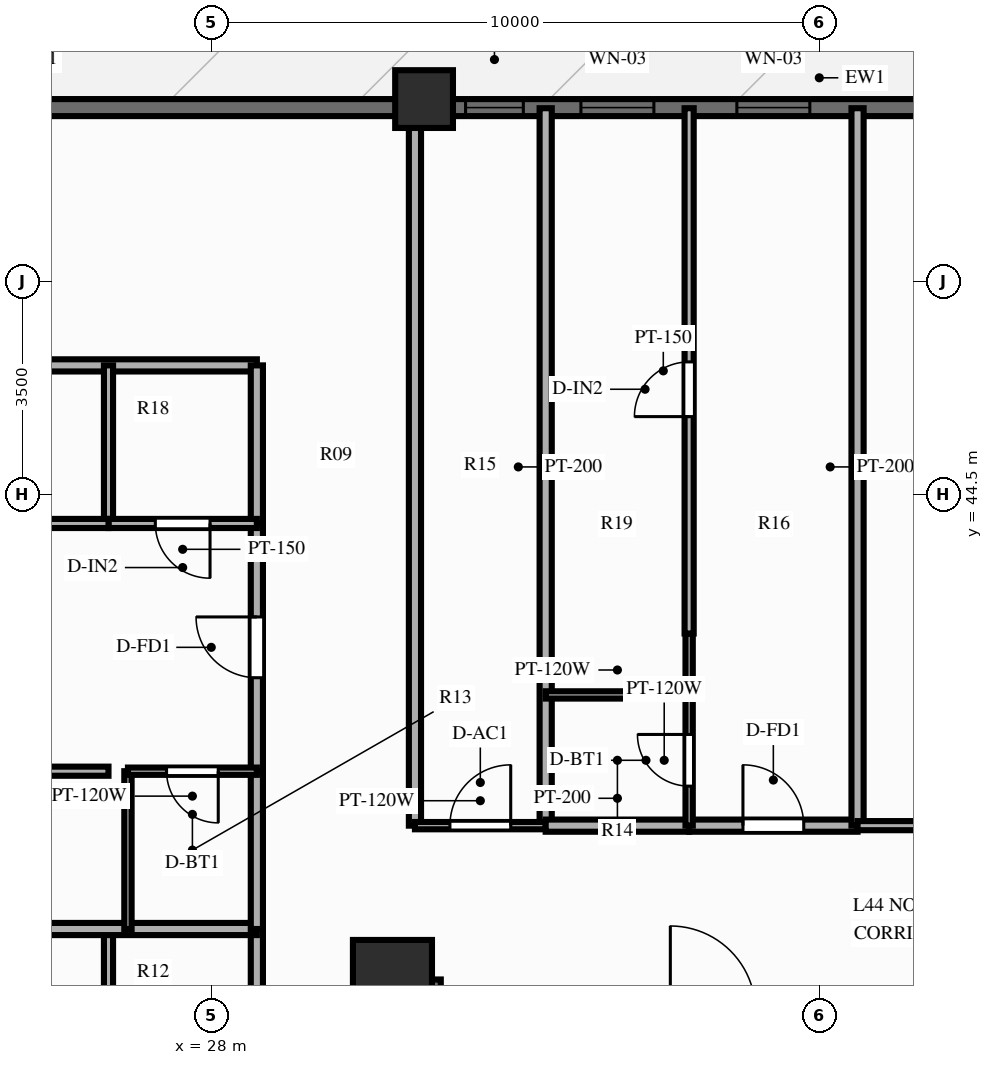
"""IFC4 building model, lengths in metres.
Left out: names, types, materials, properties, quantities, classifications, styles, units other than length and angle.
Written with IfcOpenShell. Run it as: python <this file> out.ifc"""

import sys

from ifc_helpers import new_model, si_unit, direction, frame, frame_2d, origin, origin_2d, place, context, subcontext, project, spatial, rectangle, extrude, source, transform, mapped, element, fill, save


model = new_model("IFC4")
c1 = context("Model", 3, precision=1e-05, world=origin(), true_north=direction((0.0, 1.0)))
c2 = subcontext(c1, "Body", "Model", "MODEL_VIEW")
j1 = project(units=[si_unit("LENGTHUNIT", "METRE"), si_unit("PLANEANGLEUNIT", "RADIAN")], contexts=[c1])
p1 = place(None, origin())
s1 = spatial("IfcSite", under=j1, at=p1, CompositionType="ELEMENT")
p2 = place(p1, origin())
s2 = spatial("IfcBuilding", under=s1, at=p2, CompositionType="ELEMENT")
p3 = place(p2, frame((0.0, 0.0, 138.75)))
s3 = spatial("IfcBuildingStorey", under=s2, at=p3, CompositionType="ELEMENT", Elevation=138.75)
p4 = place(p3, frame((31.5, 17.48, 0.0), z_axis=(0.0, 0.0, 1.0), x_axis=(0.0, 1.0, 0.0)))
e1 = element("IfcWall", 1, at=p4, inside=s3, PredefinedType="SHEAR", context=c2, shape_type="SweptSolid", body=[
    extrude(rectangle(XDim=19.04, YDim=0.55, at=frame_2d((9.52, 0.0))), origin(), (0.0, 0.0, 1.0), 3.0),
])
p5 = place(p4, frame((6.32, 0.0, 0.0)))
e2 = element("IfcOpeningElement", 2, at=p5, cuts=e1, PredefinedType="OPENING", context=c2, shape_type="SweptSolid", body=[
    extrude(rectangle(XDim=1.1, YDim=2.15, at=frame_2d((0.55, 1.075))), frame((0.0, 0.287, 0.0), z_axis=(0.0, -1.0, 0.0), x_axis=(1.0, 0.0, 0.0)), (0.0, 0.0, 1.0), 0.574),
])
m1 = source(origin(), c2, "Body", "SweptSolid", [
    extrude(rectangle(XDim=1.3, YDim=1.3, at=origin_2d()), origin(), (0.0, 0.0, 1.0), 3.0),
])
p6 = place(p3, frame((30.98, 36.52, 0.0), z_axis=(0.0, 0.0, 1.0), x_axis=(1.0, 0.0, 0.0)))
e3 = element("IfcColumn", 3, at=p6, inside=s3, PredefinedType="COLUMN", context=c2, shape_type="MappedRepresentation", body=[
    mapped(m1, transform((0.0, 0.0, 0.0), scale=1.0)),
])
m2 = source(origin(), c2, "Body", "SweptSolid", [
    extrude(rectangle(XDim=0.95, YDim=0.95, at=origin_2d()), origin(), (0.0, 0.0, 1.0), 3.0),
])
p7 = place(p3, frame((31.5, 51.0, 0.0), z_axis=(0.0, 0.0, 1.0), x_axis=(1.0, 0.0, 0.0)))
e4 = element("IfcColumn", 4, at=p7, inside=s3, PredefinedType="COLUMN", context=c2, shape_type="MappedRepresentation", body=[
    mapped(m2, transform((0.0, 0.0, 0.0), scale=1.0)),
])
p8 = place(p3, frame((16.2, 50.86, 0.0), z_axis=(0.0, 0.0, 1.0), x_axis=(1.0, 0.0, 0.0)))
e5 = element("IfcWall", 5, at=p8, inside=s3, PredefinedType="SOLIDWALL", context=c2, shape_type="SweptSolid", body=[
    extrude(rectangle(XDim=43.6, YDim=0.28, at=frame_2d((21.8, 0.0))), origin(), (0.0, 0.0, 1.0), 2.28),
])
p9 = place(p8, frame((7.1, 0.0, 0.0)))
e6 = element("IfcOpeningElement", 6, at=p9, cuts=e5, PredefinedType="OPENING", context=c2, shape_type="SweptSolid", body=[
    extrude(rectangle(XDim=1.1, YDim=2.15, at=frame_2d((0.55, 1.075))), frame((0.0, 0.152, 0.0), z_axis=(0.0, -1.0, 0.0), x_axis=(1.0, 0.0, 0.0)), (0.0, 0.0, 1.0), 0.304),
])
p10 = place(p8, frame((15.982, 0.0, 0.25)))
e7 = element("IfcOpeningElement", 7, at=p10, cuts=e5, PredefinedType="OPENING", context=c2, shape_type="SweptSolid", body=[
    extrude(rectangle(XDim=0.95, YDim=1.5, at=frame_2d((0.475, 0.75))), frame((0.0, 0.152, 0.0), z_axis=(0.0, -1.0, 0.0), x_axis=(1.0, 0.0, 0.0)), (0.0, 0.0, 1.0), 0.304),
])
p11 = place(p8, frame((17.88, 0.0, 0.25)))
e8 = element("IfcOpeningElement", 8, at=p11, cuts=e5, PredefinedType="OPENING", context=c2, shape_type="SweptSolid", body=[
    extrude(rectangle(XDim=1.2, YDim=1.5, at=frame_2d((0.6, 0.75))), frame((0.0, 0.152, 0.0), z_axis=(0.0, -1.0, 0.0), x_axis=(1.0, 0.0, 0.0)), (0.0, 0.0, 1.0), 0.304),
])
p12 = place(p8, frame((20.444, 0.0, 0.25)))
e9 = element("IfcOpeningElement", 9, at=p12, cuts=e5, PredefinedType="OPENING", context=c2, shape_type="SweptSolid", body=[
    extrude(rectangle(XDim=1.2, YDim=1.5, at=frame_2d((0.6, 0.75))), frame((0.0, 0.152, 0.0), z_axis=(0.0, -1.0, 0.0), x_axis=(1.0, 0.0, 0.0)), (0.0, 0.0, 1.0), 0.304),
])
p13 = place(p8, frame((24.607, 0.0, 0.25)))
e10 = element("IfcOpeningElement", 10, at=p13, cuts=e5, PredefinedType="OPENING", context=c2, shape_type="SweptSolid", body=[
    extrude(rectangle(XDim=1.2, YDim=1.5, at=frame_2d((0.6, 0.75))), frame((0.0, 0.152, 0.0), z_axis=(0.0, -1.0, 0.0), x_axis=(1.0, 0.0, 0.0)), (0.0, 0.0, 1.0), 0.304),
])
p14 = place(p8, frame((35.35, 0.0, 0.25)))
e11 = element("IfcOpeningElement", 11, at=p14, cuts=e5, PredefinedType="OPENING", context=c2, shape_type="SweptSolid", body=[
    extrude(rectangle(XDim=1.2, YDim=1.5, at=frame_2d((0.6, 0.75))), frame((0.0, 0.152, 0.0), z_axis=(0.0, -1.0, 0.0), x_axis=(1.0, 0.0, 0.0)), (0.0, 0.0, 1.0), 0.304),
])
p15 = place(p3, frame((31.35, 39.05, 0.0), z_axis=(0.0, 0.0, 1.0), x_axis=(0.0, 1.0, 0.0)))
e12 = element("IfcWall", 12, at=p15, inside=s3, PredefinedType="PARTITIONING", context=c2, shape_type="SweptSolid", body=[
    extrude(rectangle(XDim=11.8, YDim=0.2, at=frame_2d((5.9, 0.0))), origin(), (0.0, 0.0, 1.0), 2.34),
])
p16 = place(p3, frame((33.5, 39.05, 0.0), z_axis=(0.0, 0.0, 1.0), x_axis=(0.0, 1.0, 0.0)))
e13 = element("IfcWall", 13, at=p16, inside=s3, PredefinedType="PARTITIONING", context=c2, shape_type="SweptSolid", body=[
    extrude(rectangle(XDim=11.8, YDim=0.2, at=frame_2d((5.9, 0.0))), origin(), (0.0, 0.0, 1.0), 2.79),
])
p17 = place(p3, frame((31.35, 39.05, 0.0), z_axis=(0.0, 0.0, 1.0), x_axis=(1.0, 0.0, 0.0)))
e14 = element("IfcWall", 14, at=p17, inside=s3, PredefinedType="PARTITIONING", context=c2, shape_type="SweptSolid", body=[
    extrude(rectangle(XDim=2.15, YDim=0.12, at=frame_2d((1.075, 0.0))), origin(), (0.0, 0.0, 1.0), 2.79),
])
p18 = place(p17, frame((0.575, 0.0, 0.0)))
e15 = element("IfcOpeningElement", 15, at=p18, cuts=e14, PredefinedType="OPENING", context=c2, shape_type="SweptSolid", body=[
    extrude(rectangle(XDim=1.0, YDim=2.1, at=frame_2d((0.5, 1.05))), frame((0.0, 0.072, 0.0), z_axis=(0.0, -1.0, 0.0), x_axis=(1.0, 0.0, 0.0)), (0.0, 0.0, 1.0), 0.144),
])
p19 = place(p3, frame((33.5, 39.05, 0.0), z_axis=(0.0, 0.0, 1.0), x_axis=(1.0, 0.0, 0.0)))
e16 = element("IfcWall", 16, at=p19, inside=s3, PredefinedType="PARTITIONING", context=c2, shape_type="SweptSolid", body=[
    extrude(rectangle(XDim=2.359, YDim=0.2, at=frame_2d((1.18, 0.0))), origin(), (0.0, 0.0, 1.0), 2.79),
])
p20 = place(p3, frame((35.859, 39.05, 0.0), z_axis=(0.0, 0.0, 1.0), x_axis=(1.0, 0.0, 0.0)))
e17 = element("IfcWall", 17, at=p20, inside=s3, PredefinedType="PARTITIONING", context=c2, shape_type="SweptSolid", body=[
    extrude(rectangle(XDim=2.77, YDim=0.2, at=frame_2d((1.385, 0.0))), origin(), (0.0, 0.0, 1.0), 2.79),
])
p21 = place(p20, frame((0.885, 0.0, 0.0)))
e18 = element("IfcOpeningElement", 18, at=p21, cuts=e17, PredefinedType="OPENING", context=c2, shape_type="SweptSolid", body=[
    extrude(rectangle(XDim=1.0, YDim=2.15, at=frame_2d((0.5, 1.075))), frame((0.0, 0.112, 0.0), z_axis=(0.0, -1.0, 0.0), x_axis=(1.0, 0.0, 0.0)), (0.0, 0.0, 1.0), 0.224),
])
p22 = place(p3, frame((35.859, 39.05, 0.0), z_axis=(0.0, 0.0, 1.0), x_axis=(0.0, 1.0, 0.0)))
e19 = element("IfcWall", 19, at=p22, inside=s3, PredefinedType="PARTITIONING", context=c2, shape_type="SweptSolid", body=[
    extrude(rectangle(XDim=2.15, YDim=0.12, at=frame_2d((1.075, 0.0))), origin(), (0.0, 0.0, 1.0), 2.79),
])
p23 = place(p22, frame((0.65, 0.0, 0.0)))
e20 = element("IfcOpeningElement", 20, at=p23, cuts=e19, PredefinedType="OPENING", context=c2, shape_type="SweptSolid", body=[
    extrude(rectangle(XDim=0.85, YDim=2.05, at=frame_2d((0.425, 1.025))), frame((0.0, 0.072, 0.0), z_axis=(0.0, -1.0, 0.0), x_axis=(1.0, 0.0, 0.0)), (0.0, 0.0, 1.0), 0.144),
])
p24 = place(p3, frame((35.859, 41.2, 0.0), z_axis=(0.0, 0.0, 1.0), x_axis=(0.0, 1.0, 0.0)))
e21 = element("IfcWall", 21, at=p24, inside=s3, PredefinedType="PARTITIONING", context=c2, shape_type="SweptSolid", body=[
    extrude(rectangle(XDim=1.01, YDim=0.12, at=frame_2d((0.505, 0.0))), origin(), (0.0, 0.0, 1.0), 2.79),
])
p25 = place(p3, frame((33.5, 41.2, 0.0), z_axis=(0.0, 0.0, 1.0), x_axis=(1.0, 0.0, 0.0)))
e22 = element("IfcWall", 22, at=p25, inside=s3, PredefinedType="PARTITIONING", context=c2, shape_type="SweptSolid", body=[
    extrude(rectangle(XDim=2.359, YDim=0.12, at=frame_2d((1.18, 0.0))), origin(), (0.0, 0.0, 1.0), 2.79),
])
p26 = place(p3, frame((35.859, 42.21, 0.0), z_axis=(0.0, 0.0, 1.0), x_axis=(0.0, 1.0, 0.0)))
e23 = element("IfcWall", 23, at=p26, inside=s3, PredefinedType="PARTITIONING", context=c2, shape_type="SweptSolid", body=[
    extrude(rectangle(XDim=8.64, YDim=0.15, at=frame_2d((4.32, 0.0))), origin(), (0.0, 0.0, 1.0), 2.79),
])
p27 = place(p26, frame((3.567, 0.0, 0.0)))
e24 = element("IfcOpeningElement", 24, at=p27, cuts=e23, PredefinedType="OPENING", context=c2, shape_type="SweptSolid", body=[
    extrude(rectangle(XDim=0.9, YDim=2.1, at=frame_2d((0.45, 1.05))), frame((0.0, 0.087, 0.0), z_axis=(0.0, -1.0, 0.0), x_axis=(1.0, 0.0, 0.0)), (0.0, 0.0, 1.0), 0.174),
])
p28 = place(p3, frame((38.629, 39.05, 0.0), z_axis=(0.0, 0.0, 1.0), x_axis=(0.0, 1.0, 0.0)))
e25 = element("IfcWall", 25, at=p28, inside=s3, PredefinedType="PARTITIONING", context=c2, shape_type="SweptSolid", body=[
    extrude(rectangle(XDim=11.8, YDim=0.2, at=frame_2d((5.9, 0.0))), origin(), (0.0, 0.0, 1.0), 2.79),
])
p29 = place(p3, frame((38.629, 39.05, 0.0), z_axis=(0.0, 0.0, 1.0), x_axis=(1.0, 0.0, 0.0)))
e26 = element("IfcWall", 26, at=p29, inside=s3, PredefinedType="PARTITIONING", context=c2, shape_type="SweptSolid", body=[
    extrude(rectangle(XDim=6.021, YDim=0.15, at=frame_2d((3.01, 0.0))), origin(), (0.0, 0.0, 1.0), 2.79),
])
p30 = place(p29, frame((2.46, 0.0, 0.0)))
e27 = element("IfcOpeningElement", 27, at=p30, cuts=e26, PredefinedType="OPENING", context=c2, shape_type="SweptSolid", body=[
    extrude(rectangle(XDim=1.1, YDim=2.15, at=frame_2d((0.55, 1.075))), frame((0.0, 0.087, 0.0), z_axis=(0.0, -1.0, 0.0), x_axis=(1.0, 0.0, 0.0)), (0.0, 0.0, 1.0), 0.174),
])
p31 = place(p3, frame((28.75, 46.62, 0.0), z_axis=(0.0, 0.0, 1.0), x_axis=(-1.0, 0.0, 0.0)))
e28 = element("IfcWall", 28, at=p31, inside=s3, PredefinedType="PARTITIONING", context=c2, shape_type="SweptSolid", body=[
    extrude(rectangle(XDim=16.6, YDim=0.2, at=frame_2d((8.3, 0.0))), origin(), (0.0, 0.0, 1.0), 2.79),
])
p32 = place(p3, frame((28.75, 34.75, 0.0), z_axis=(0.0, 0.0, 1.0), x_axis=(0.0, 1.0, 0.0)))
e29 = element("IfcWall", 29, at=p32, inside=s3, PredefinedType="PARTITIONING", context=c2, shape_type="SweptSolid", body=[
    extrude(rectangle(XDim=2.6, YDim=0.2, at=frame_2d((1.3, 0.0))), origin(), (0.0, 0.0, 1.0), 2.79),
])
p33 = place(p3, frame((26.31, 34.75, 0.0), z_axis=(0.0, 0.0, 1.0), x_axis=(0.0, 1.0, 0.0)))
e30 = element("IfcWall", 30, at=p33, inside=s3, PredefinedType="PARTITIONING", context=c2, shape_type="SweptSolid", body=[
    extrude(rectangle(XDim=2.6, YDim=0.15, at=frame_2d((1.3, 0.0))), origin(), (0.0, 0.0, 1.0), 2.79),
])
p34 = place(p3, frame((28.75, 37.35, 0.0), z_axis=(0.0, 0.0, 1.0), x_axis=(-1.0, 0.0, 0.0)))
e31 = element("IfcWall", 31, at=p34, inside=s3, PredefinedType="PARTITIONING", context=c2, shape_type="SweptSolid", body=[
    extrude(rectangle(XDim=16.6, YDim=0.2, at=frame_2d((8.3, 0.0))), origin(), (0.0, 0.0, 1.0), 2.79),
])
p35 = place(p3, frame((28.75, 37.35, 0.0), z_axis=(0.0, 0.0, 1.0), x_axis=(0.0, 1.0, 0.0)))
e32 = element("IfcWall", 32, at=p35, inside=s3, PredefinedType="PARTITIONING", context=c2, shape_type="SweptSolid", body=[
    extrude(rectangle(XDim=2.595, YDim=0.2, at=frame_2d((1.298, 0.0))), origin(), (0.0, 0.0, 1.0), 2.79),
])
p36 = place(p3, frame((28.75, 39.946, 0.0), z_axis=(0.0, 0.0, 1.0), x_axis=(0.0, 1.0, 0.0)))
e33 = element("IfcWall", 33, at=p36, inside=s3, PredefinedType="PARTITIONING", context=c2, shape_type="SweptSolid", body=[
    extrude(rectangle(XDim=4.074, YDim=0.2, at=frame_2d((2.037, 0.0))), origin(), (0.0, 0.0, 1.0), 2.79),
])
p37 = place(p36, frame((1.537, 0.0, 0.0)))
e34 = element("IfcOpeningElement", 34, at=p37, cuts=e33, PredefinedType="OPENING", context=c2, shape_type="SweptSolid", body=[
    extrude(rectangle(XDim=1.0, YDim=2.15, at=frame_2d((0.5, 1.075))), frame((0.0, 0.112, 0.0), z_axis=(0.0, -1.0, 0.0), x_axis=(1.0, 0.0, 0.0)), (0.0, 0.0, 1.0), 0.224),
])
p38 = place(p3, frame((28.75, 44.02, 0.0), z_axis=(0.0, 0.0, 1.0), x_axis=(0.0, 1.0, 0.0)))
e35 = element("IfcWall", 35, at=p38, inside=s3, PredefinedType="PARTITIONING", context=c2, shape_type="SweptSolid", body=[
    extrude(rectangle(XDim=2.6, YDim=0.2, at=frame_2d((1.3, 0.0))), origin(), (0.0, 0.0, 1.0), 2.79),
])
p39 = place(p3, frame((26.63, 37.35, 0.0), z_axis=(0.0, 0.0, 1.0), x_axis=(0.0, 1.0, 0.0)))
e36 = element("IfcWall", 36, at=p39, inside=s3, PredefinedType="PARTITIONING", context=c2, shape_type="SweptSolid", body=[
    extrude(rectangle(XDim=2.595, YDim=0.12, at=frame_2d((1.298, 0.0))), origin(), (0.0, 0.0, 1.0), 2.79),
])
p40 = place(p3, frame((26.31, 44.02, 0.0), z_axis=(0.0, 0.0, 1.0), x_axis=(0.0, 1.0, 0.0)))
e37 = element("IfcWall", 37, at=p40, inside=s3, PredefinedType="PARTITIONING", context=c2, shape_type="SweptSolid", body=[
    extrude(rectangle(XDim=2.6, YDim=0.15, at=frame_2d((1.3, 0.0))), origin(), (0.0, 0.0, 1.0), 2.79),
])
p41 = place(p3, frame((28.75, 39.946, 0.0), z_axis=(0.0, 0.0, 1.0), x_axis=(-1.0, 0.0, 0.0)))
e38 = element("IfcWall", 38, at=p41, inside=s3, PredefinedType="PARTITIONING", context=c2, shape_type="SweptSolid", body=[
    extrude(rectangle(XDim=2.12, YDim=0.12, at=frame_2d((1.06, 0.0))), origin(), (0.0, 0.0, 1.0), 2.79),
])
p42 = place(p41, frame((0.635, 0.0, 0.0)))
e39 = element("IfcOpeningElement", 39, at=p42, cuts=e38, PredefinedType="OPENING", context=c2, shape_type="SweptSolid", body=[
    extrude(rectangle(XDim=0.85, YDim=2.05, at=frame_2d((0.425, 1.025))), frame((0.0, 0.072, 0.0), z_axis=(0.0, -1.0, 0.0), x_axis=(1.0, 0.0, 0.0)), (0.0, 0.0, 1.0), 0.144),
])
p43 = place(p3, frame((26.31, 39.946, 0.0), z_axis=(0.0, 0.0, 1.0), x_axis=(-1.0, 0.0, 0.0)))
e40 = element("IfcWall", 40, at=p43, inside=s3, PredefinedType="PARTITIONING", context=c2, shape_type="SweptSolid", body=[
    extrude(rectangle(XDim=14.16, YDim=0.15, at=frame_2d((7.08, 0.0))), origin(), (0.0, 0.0, 1.0), 2.79),
])
p44 = place(p43, frame((6.097, 0.0, 0.0)))
e41 = element("IfcOpeningElement", 41, at=p44, cuts=e40, PredefinedType="OPENING", context=c2, shape_type="SweptSolid", body=[
    extrude(rectangle(XDim=0.9, YDim=2.1, at=frame_2d((0.45, 1.05))), frame((0.0, 0.087, 0.0), z_axis=(0.0, -1.0, 0.0), x_axis=(1.0, 0.0, 0.0)), (0.0, 0.0, 1.0), 0.174),
])
p45 = place(p3, frame((28.75, 44.02, 0.0), z_axis=(0.0, 0.0, 1.0), x_axis=(-1.0, 0.0, 0.0)))
e42 = element("IfcWall", 42, at=p45, inside=s3, PredefinedType="PARTITIONING", context=c2, shape_type="SweptSolid", body=[
    extrude(rectangle(XDim=2.44, YDim=0.15, at=frame_2d((1.22, 0.0))), origin(), (0.0, 0.0, 1.0), 2.79),
])
p46 = place(p45, frame((0.77, 0.0, 0.0)))
e43 = element("IfcOpeningElement", 43, at=p46, cuts=e42, PredefinedType="OPENING", context=c2, shape_type="SweptSolid", body=[
    extrude(rectangle(XDim=0.9, YDim=2.1, at=frame_2d((0.45, 1.05))), frame((0.0, 0.087, 0.0), z_axis=(0.0, -1.0, 0.0), x_axis=(1.0, 0.0, 0.0)), (0.0, 0.0, 1.0), 0.174),
])
p47 = place(p3, frame((26.31, 44.02, 0.0), z_axis=(0.0, 0.0, 1.0), x_axis=(-1.0, 0.0, 0.0)))
e44 = element("IfcWall", 44, at=p47, inside=s3, PredefinedType="PARTITIONING", context=c2, shape_type="SweptSolid", body=[
    extrude(rectangle(XDim=14.16, YDim=0.15, at=frame_2d((7.08, 0.0))), origin(), (0.0, 0.0, 1.0), 2.79),
])
p48 = place(p47, frame((6.097, 0.0, 0.0)))
e45 = element("IfcOpeningElement", 45, at=p48, cuts=e44, PredefinedType="OPENING", context=c2, shape_type="SweptSolid", body=[
    extrude(rectangle(XDim=0.9, YDim=2.1, at=frame_2d((0.45, 1.05))), frame((0.0, 0.087, 0.0), z_axis=(0.0, -1.0, 0.0), x_axis=(1.0, 0.0, 0.0)), (0.0, 0.0, 1.0), 0.174),
])
m3 = source(origin(), c2, "Body", "SweptSolid", [
    extrude(rectangle(XDim=0.95, YDim=1.5, at=frame_2d((0.475, 0.75))), frame((0.0, 0.03, 0.0), z_axis=(0.0, -1.0, 0.0), x_axis=(1.0, 0.0, 0.0)), (0.0, 0.0, 1.0), 0.06),
])
p49 = place(p10, origin())
e46 = element("IfcWindow", 46, at=p49, inside=s3, PartitioningType="SINGLE_PANEL", PredefinedType="WINDOW", context=c2, shape_type="MappedRepresentation", body=[
    mapped(m3, transform((0.0, 0.0, 0.0), scale=1.0)),
])
fill(e7, e46)
m4 = source(origin(), c2, "Body", "SweptSolid", [
    extrude(rectangle(XDim=1.2, YDim=1.5, at=frame_2d((0.6, 0.75))), frame((0.0, 0.03, 0.0), z_axis=(0.0, -1.0, 0.0), x_axis=(1.0, 0.0, 0.0)), (0.0, 0.0, 1.0), 0.06),
])
p50 = place(p11, origin())
e47 = element("IfcWindow", 47, at=p50, inside=s3, PartitioningType="SINGLE_PANEL", PredefinedType="WINDOW", context=c2, shape_type="MappedRepresentation", body=[
    mapped(m4, transform((0.0, 0.0, 0.0), scale=1.0)),
])
fill(e8, e47)
p51 = place(p12, origin())
e48 = element("IfcWindow", 48, at=p51, inside=s3, PartitioningType="SINGLE_PANEL", PredefinedType="WINDOW", context=c2, shape_type="MappedRepresentation", body=[
    mapped(m4, transform((0.0, 0.0, 0.0), scale=1.0)),
])
fill(e9, e48)
m5 = source(origin(), c2, "Body", "SweptSolid", [
    extrude(rectangle(XDim=1.0, YDim=2.1, at=frame_2d((0.5, 1.05))), frame((0.0, 0.025, 0.0), z_axis=(0.0, -1.0, 0.0), x_axis=(1.0, 0.0, 0.0)), (0.0, 0.0, 1.0), 0.05),
])
p52 = place(p18, origin())
e49 = element("IfcDoor", 49, at=p52, inside=s3, OperationType="SINGLE_SWING_RIGHT", PredefinedType="DOOR", context=c2, shape_type="MappedRepresentation", body=[
    mapped(m5, transform((0.0, 0.0, 0.0), scale=1.0)),
])
fill(e15, e49)
m6 = source(origin(), c2, "Body", "SweptSolid", [
    extrude(rectangle(XDim=1.0, YDim=2.15, at=frame_2d((0.5, 1.075))), frame((0.0, 0.025, 0.0), z_axis=(0.0, -1.0, 0.0), x_axis=(1.0, 0.0, 0.0)), (0.0, 0.0, 1.0), 0.05),
])
p53 = place(p21, origin())
e50 = element("IfcDoor", 50, at=p53, inside=s3, OperationType="SINGLE_SWING_LEFT", PredefinedType="DOOR", context=c2, shape_type="MappedRepresentation", body=[
    mapped(m6, transform((0.0, 0.0, 0.0), scale=1.0)),
])
fill(e18, e50)
m7 = source(origin(), c2, "Body", "SweptSolid", [
    extrude(rectangle(XDim=0.85, YDim=2.05, at=frame_2d((0.425, 1.025))), frame((0.0, 0.025, 0.0), z_axis=(0.0, -1.0, 0.0), x_axis=(1.0, 0.0, 0.0)), (0.0, 0.0, 1.0), 0.05),
])
p54 = place(p23, origin())
e51 = element("IfcDoor", 51, at=p54, inside=s3, OperationType="SINGLE_SWING_RIGHT", PredefinedType="DOOR", context=c2, shape_type="MappedRepresentation", body=[
    mapped(m7, transform((0.0, 0.0, 0.0), scale=1.0)),
])
fill(e20, e51)
m8 = source(origin(), c2, "Body", "SweptSolid", [
    extrude(rectangle(XDim=0.9, YDim=2.1, at=frame_2d((0.45, 1.05))), frame((0.0, 0.025, 0.0), z_axis=(0.0, -1.0, 0.0), x_axis=(1.0, 0.0, 0.0)), (0.0, 0.0, 1.0), 0.05),
])
p55 = place(p27, origin())
e52 = element("IfcDoor", 52, at=p55, inside=s3, OperationType="SINGLE_SWING_LEFT", PredefinedType="DOOR", context=c2, shape_type="MappedRepresentation", body=[
    mapped(m8, transform((0.0, 0.0, 0.0), scale=1.0)),
])
fill(e24, e52)
p56 = place(p37, origin())
e53 = element("IfcDoor", 53, at=p56, inside=s3, OperationType="SINGLE_SWING_RIGHT", PredefinedType="DOOR", context=c2, shape_type="MappedRepresentation", body=[
    mapped(m6, transform((0.0, 0.0, 0.0), scale=1.0)),
])
fill(e34, e53)
p57 = place(p42, origin())
e54 = element("IfcDoor", 54, at=p57, inside=s3, OperationType="SINGLE_SWING_LEFT", PredefinedType="DOOR", context=c2, shape_type="MappedRepresentation", body=[
    mapped(m7, transform((0.0, 0.0, 0.0), scale=1.0)),
])
fill(e39, e54)
p58 = place(p46, origin())
e55 = element("IfcDoor", 55, at=p58, inside=s3, OperationType="SINGLE_SWING_LEFT", PredefinedType="DOOR", context=c2, shape_type="MappedRepresentation", body=[
    mapped(m8, transform((0.0, 0.0, 0.0), scale=1.0)),
])
fill(e43, e55)
save(model, sys.argv[1])
